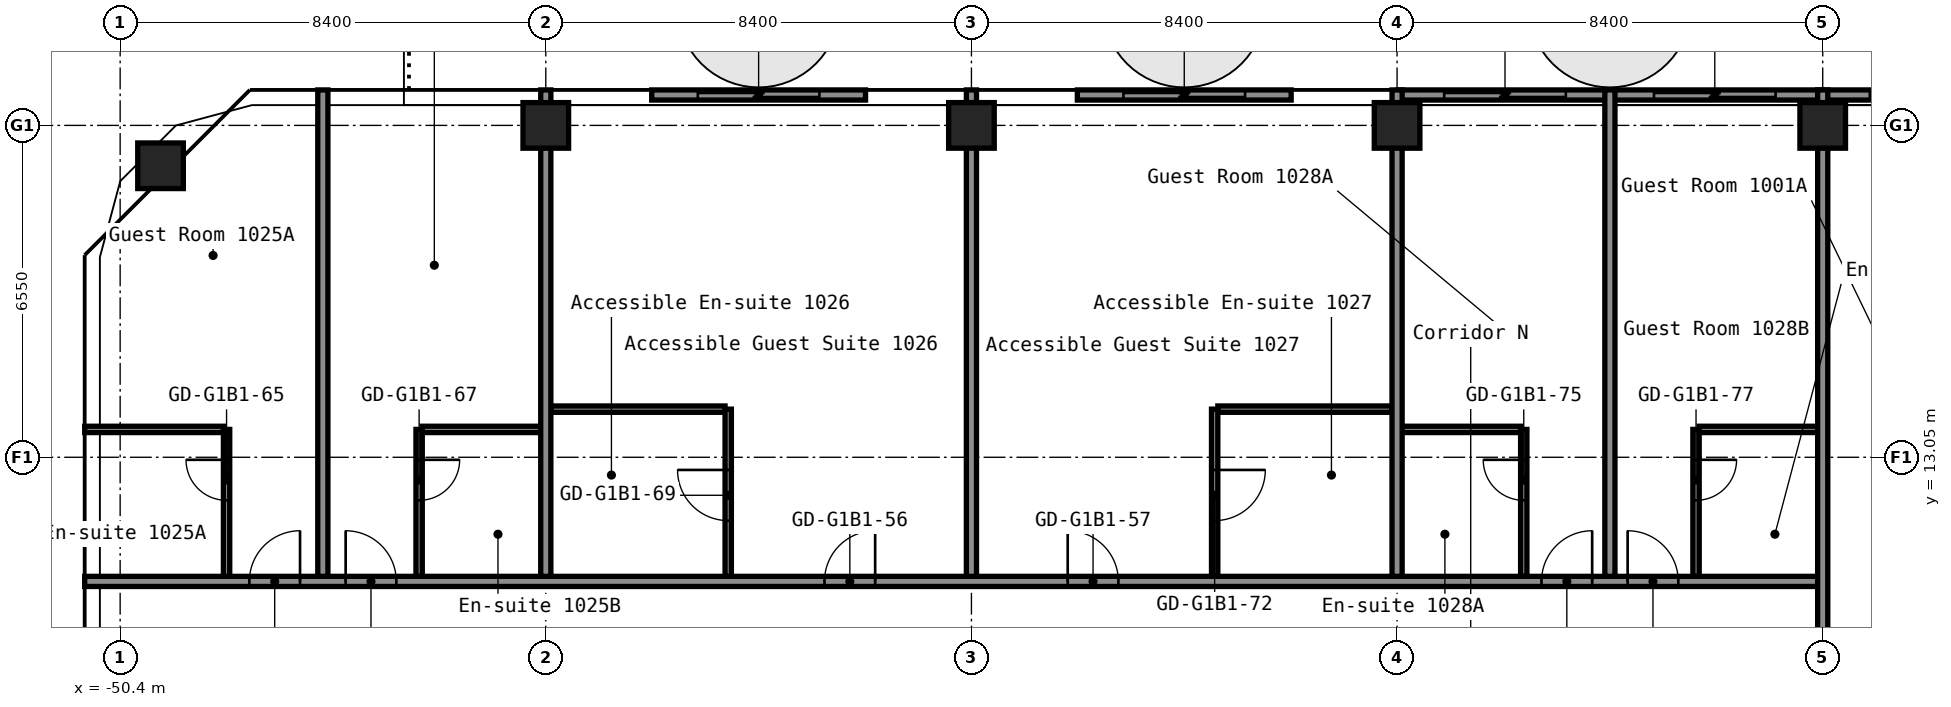
"""IFC4 building model, lengths in metres.
Left out: names, types, materials, properties, quantities, classifications, styles, units other than length and angle.
Written with IfcOpenShell. Run it as: python <this file> out.ifc"""

import sys

from ifc_helpers import new_model, si_unit, direction, frame, frame_2d, origin, origin_2d, place, context, subcontext, project, spatial, rectangle, hollow_rectangle, extrude, element, fill, save


model = new_model("IFC4")
c1 = context("Model", 3, precision=1e-05, world=origin(), true_north=direction((0.0, 1.0)))
c2 = subcontext(c1, "Body", "Model", "MODEL_VIEW")
j1 = project(units=[si_unit("LENGTHUNIT", "METRE"), si_unit("PLANEANGLEUNIT", "RADIAN")], contexts=[c1])
p1 = place(None, origin())
s1 = spatial("IfcSite", under=j1, at=p1, CompositionType="ELEMENT")
p2 = place(p1, origin())
s2 = spatial("IfcBuilding", under=s1, at=p2, CompositionType="ELEMENT")
p3 = place(p2, frame((0.0, 0.0, 39.0)))
s3 = spatial("IfcBuildingStorey", under=s2, at=p3, CompositionType="ELEMENT", Elevation=39.0)
for number, where, z_axis, x_axis in (
    (1, (-49.603, 18.803, 0.0), (0.0, 0.0, 1.0), (1.0, 0.0, 0.0)),
    (2, (-42.0, 19.6, 0.0), (0.0, 0.0, 1.0), (1.0, 0.0, 0.0)),
    (3, (-33.6, 19.6, 0.0), (0.0, 0.0, 1.0), (1.0, 0.0, 0.0)),
    (4, (-25.2, 19.6, 0.0), (0.0, 0.0, 1.0), (1.0, 0.0, 0.0)),
    (5, (-16.8, 19.6, 0.0), (0.0, 0.0, 1.0), (1.0, 0.0, 0.0)),
):
    element("IfcColumn", number, at=place(p3, frame(where, z_axis=z_axis, x_axis=x_axis)), inside=s3, PredefinedType="COLUMN", context=c2, shape_type="SweptSolid", body=[
        extrude(hollow_rectangle(XDim=0.9, YDim=0.9, WallThickness=0.036, at=origin_2d()), origin(), (0.0, 0.0, 1.0), 2.8),
    ])
p4 = place(p3, frame((-51.1, 10.6, 0.0), z_axis=(0.0, 0.0, 1.0), x_axis=(1.0, 0.0, 0.0)))
e6 = element("IfcWall", 6, at=p4, inside=s3, PredefinedType="PARTITIONING", context=c2, shape_type="SweptSolid", body=[
    extrude(rectangle(XDim=34.3, YDim=0.2, at=frame_2d((17.15, 0.0))), origin(), (0.0, 0.0, 1.0), 2.8),
])
p5 = place(p4, frame((3.25, 0.0, 0.0)))
e7 = element("IfcOpeningElement", 7, at=p5, cuts=e6, PredefinedType="OPENING", context=c2, shape_type="SweptSolid", body=[
    extrude(rectangle(XDim=1.0, YDim=2.1, at=frame_2d((0.5, 1.05))), frame((0.0, 0.11, 0.0), z_axis=(0.0, -1.0, 0.0), x_axis=(1.0, 0.0, 0.0)), (0.0, 0.0, 1.0), 0.22),
])
p6 = place(p4, frame((5.15, 0.0, 0.0)))
e8 = element("IfcOpeningElement", 8, at=p6, cuts=e6, PredefinedType="OPENING", context=c2, shape_type="SweptSolid", body=[
    extrude(rectangle(XDim=1.0, YDim=2.1, at=frame_2d((0.5, 1.05))), frame((0.0, 0.11, 0.0), z_axis=(0.0, -1.0, 0.0), x_axis=(1.0, 0.0, 0.0)), (0.0, 0.0, 1.0), 0.22),
])
p7 = place(p4, frame((14.6, 0.0, 0.0)))
e9 = element("IfcOpeningElement", 9, at=p7, cuts=e6, PredefinedType="OPENING", context=c2, shape_type="SweptSolid", body=[
    extrude(rectangle(XDim=1.0, YDim=2.1, at=frame_2d((0.5, 1.05))), frame((0.0, 0.11, 0.0), z_axis=(0.0, -1.0, 0.0), x_axis=(1.0, 0.0, 0.0)), (0.0, 0.0, 1.0), 0.22),
])
p8 = place(p4, frame((19.4, 0.0, 0.0)))
e10 = element("IfcOpeningElement", 10, at=p8, cuts=e6, PredefinedType="OPENING", context=c2, shape_type="SweptSolid", body=[
    extrude(rectangle(XDim=1.0, YDim=2.1, at=frame_2d((0.5, 1.05))), frame((0.0, 0.11, 0.0), z_axis=(0.0, -1.0, 0.0), x_axis=(1.0, 0.0, 0.0)), (0.0, 0.0, 1.0), 0.22),
])
p9 = place(p4, frame((28.75, 0.0, 0.0)))
e11 = element("IfcOpeningElement", 11, at=p9, cuts=e6, PredefinedType="OPENING", context=c2, shape_type="SweptSolid", body=[
    extrude(rectangle(XDim=1.0, YDim=2.1, at=frame_2d((0.5, 1.05))), frame((0.0, 0.11, 0.0), z_axis=(0.0, -1.0, 0.0), x_axis=(1.0, 0.0, 0.0)), (0.0, 0.0, 1.0), 0.22),
])
p10 = place(p4, frame((30.45, 0.0, 0.0)))
e12 = element("IfcOpeningElement", 12, at=p10, cuts=e6, PredefinedType="OPENING", context=c2, shape_type="SweptSolid", body=[
    extrude(rectangle(XDim=1.0, YDim=2.1, at=frame_2d((0.5, 1.05))), frame((0.0, 0.11, 0.0), z_axis=(0.0, -1.0, 0.0), x_axis=(1.0, 0.0, 0.0)), (0.0, 0.0, 1.0), 0.22),
])
p11 = place(p3, frame((-51.1, 13.6, 0.0), z_axis=(0.0, 0.0, 1.0), x_axis=(1.0, 0.0, 0.0)))
e13 = element("IfcWall", 13, at=p11, inside=s3, PredefinedType="PARTITIONING", context=c2, shape_type="SweptSolid", body=[
    extrude(rectangle(XDim=2.738, YDim=0.125, at=frame_2d((1.369, 0.0))), origin(), (0.0, 0.0, 1.0), 2.8),
])
p12 = place(p3, frame((-44.438, 13.6, 0.0), z_axis=(0.0, 0.0, 1.0), x_axis=(1.0, 0.0, 0.0)))
e14 = element("IfcWall", 14, at=p12, inside=s3, PredefinedType="PARTITIONING", context=c2, shape_type="SweptSolid", body=[
    extrude(rectangle(XDim=2.337, YDim=0.125, at=frame_2d((1.169, 0.0))), origin(), (0.0, 0.0, 1.0), 2.8),
])
for number, where, z_axis, x_axis in (
    (15, (-25.1, 13.6, 0.0), (0.0, 0.0, 1.0), (1.0, 0.0, 0.0)),
    (16, (-19.238, 13.6, 0.0), (0.0, 0.0, 1.0), (1.0, 0.0, 0.0)),
):
    element("IfcWall", number, at=place(p3, frame(where, z_axis=z_axis, x_axis=x_axis)), inside=s3, PredefinedType="PARTITIONING", context=c2, shape_type="SweptSolid", body=[
        extrude(rectangle(XDim=2.338, YDim=0.125, at=frame_2d((1.169, 0.0))), origin(), (0.0, 0.0, 1.0), 2.8),
    ])
for number, where, z_axis, x_axis in (
    (17, (-41.9, 14.0, 0.0), (0.0, 0.0, 1.0), (1.0, 0.0, 0.0)),
    (18, (-28.738, 14.0, 0.0), (0.0, 0.0, 1.0), (1.0, 0.0, 0.0)),
):
    element("IfcWall", number, at=place(p3, frame(where, z_axis=z_axis, x_axis=x_axis)), inside=s3, PredefinedType="PARTITIONING", context=c2, shape_type="SweptSolid", body=[
        extrude(rectangle(XDim=3.438, YDim=0.125, at=frame_2d((1.719, 0.0))), origin(), (0.0, 0.0, 1.0), 2.8),
    ])
p13 = place(p3, frame((-48.3, 10.7, 0.0), z_axis=(0.0, 0.0, 1.0), x_axis=(0.0, 1.0, 0.0)))
e19 = element("IfcWall", 19, at=p13, inside=s3, PredefinedType="PARTITIONING", context=c2, shape_type="SweptSolid", body=[
    extrude(rectangle(XDim=2.9, YDim=0.125, at=frame_2d((1.45, 0.0))), origin(), (0.0, 0.0, 1.0), 2.8),
])
p14 = place(p13, frame((1.5, 0.0, 0.0)))
e20 = element("IfcOpeningElement", 20, at=p14, cuts=e19, PredefinedType="OPENING", context=c2, shape_type="SweptSolid", body=[
    extrude(rectangle(XDim=0.8, YDim=2.1, at=frame_2d((0.4, 1.05))), frame((0.0, 0.073, 0.0), z_axis=(0.0, -1.0, 0.0), x_axis=(1.0, 0.0, 0.0)), (0.0, 0.0, 1.0), 0.145),
])
p15 = place(p3, frame((-46.4, 10.7, 0.0), z_axis=(0.0, 0.0, 1.0), x_axis=(0.0, 1.0, 0.0)))
e21 = element("IfcWall", 21, at=p15, inside=s3, PredefinedType="PARTITIONING", context=c2, shape_type="SweptSolid", body=[
    extrude(rectangle(XDim=9.6, YDim=0.2, at=frame_2d((4.8, 0.0))), origin(), (0.0, 0.0, 1.0), 2.8),
])
p16 = place(p3, frame((-44.5, 10.7, 0.0), z_axis=(0.0, 0.0, 1.0), x_axis=(0.0, 1.0, 0.0)))
e22 = element("IfcWall", 22, at=p16, inside=s3, PredefinedType="PARTITIONING", context=c2, shape_type="SweptSolid", body=[
    extrude(rectangle(XDim=2.9, YDim=0.125, at=frame_2d((1.45, 0.0))), origin(), (0.0, 0.0, 1.0), 2.8),
])
p17 = place(p16, frame((1.5, 0.0, 0.0)))
e23 = element("IfcOpeningElement", 23, at=p17, cuts=e22, PredefinedType="OPENING", context=c2, shape_type="SweptSolid", body=[
    extrude(rectangle(XDim=0.8, YDim=2.1, at=frame_2d((0.4, 1.05))), frame((0.0, 0.073, 0.0), z_axis=(0.0, -1.0, 0.0), x_axis=(1.0, 0.0, 0.0)), (0.0, 0.0, 1.0), 0.145),
])
p18 = place(p3, frame((-42.0, 10.7, 0.0), z_axis=(0.0, 0.0, 1.0), x_axis=(0.0, 1.0, 0.0)))
e24 = element("IfcWall", 24, at=p18, inside=s3, PredefinedType="PARTITIONING", context=c2, shape_type="SweptSolid", body=[
    extrude(rectangle(XDim=9.6, YDim=0.2, at=frame_2d((4.8, 0.0))), origin(), (0.0, 0.0, 1.0), 2.8),
])
p19 = place(p3, frame((-38.4, 10.7, 0.0), z_axis=(0.0, 0.0, 1.0), x_axis=(0.0, 1.0, 0.0)))
e25 = element("IfcWall", 25, at=p19, inside=s3, PredefinedType="PARTITIONING", context=c2, shape_type="SweptSolid", body=[
    extrude(rectangle(XDim=3.3, YDim=0.125, at=frame_2d((1.65, 0.0))), origin(), (0.0, 0.0, 1.0), 2.8),
])
p20 = place(p19, frame((1.1, 0.0, 0.0)))
e26 = element("IfcOpeningElement", 26, at=p20, cuts=e25, PredefinedType="OPENING", context=c2, shape_type="SweptSolid", body=[
    extrude(rectangle(XDim=1.0, YDim=2.1, at=frame_2d((0.5, 1.05))), frame((0.0, 0.073, 0.0), z_axis=(0.0, -1.0, 0.0), x_axis=(1.0, 0.0, 0.0)), (0.0, 0.0, 1.0), 0.145),
])
p21 = place(p3, frame((-33.6, 10.7, 0.0), z_axis=(0.0, 0.0, 1.0), x_axis=(0.0, 1.0, 0.0)))
e27 = element("IfcWall", 27, at=p21, inside=s3, PredefinedType="PARTITIONING", context=c2, shape_type="SweptSolid", body=[
    extrude(rectangle(XDim=9.6, YDim=0.2, at=frame_2d((4.8, 0.0))), origin(), (0.0, 0.0, 1.0), 2.8),
])
p22 = place(p3, frame((-28.8, 10.7, 0.0), z_axis=(0.0, 0.0, 1.0), x_axis=(0.0, 1.0, 0.0)))
e28 = element("IfcWall", 28, at=p22, inside=s3, PredefinedType="PARTITIONING", context=c2, shape_type="SweptSolid", body=[
    extrude(rectangle(XDim=3.3, YDim=0.125, at=frame_2d((1.65, 0.0))), origin(), (0.0, 0.0, 1.0), 2.8),
])
p23 = place(p22, frame((1.1, 0.0, 0.0)))
e29 = element("IfcOpeningElement", 29, at=p23, cuts=e28, PredefinedType="OPENING", context=c2, shape_type="SweptSolid", body=[
    extrude(rectangle(XDim=1.0, YDim=2.1, at=frame_2d((0.5, 1.05))), frame((0.0, 0.073, 0.0), z_axis=(0.0, -1.0, 0.0), x_axis=(1.0, 0.0, 0.0)), (0.0, 0.0, 1.0), 0.145),
])
p24 = place(p3, frame((-25.2, 10.7, 0.0), z_axis=(0.0, 0.0, 1.0), x_axis=(0.0, 1.0, 0.0)))
e30 = element("IfcWall", 30, at=p24, inside=s3, PredefinedType="PARTITIONING", context=c2, shape_type="SweptSolid", body=[
    extrude(rectangle(XDim=9.6, YDim=0.2, at=frame_2d((4.8, 0.0))), origin(), (0.0, 0.0, 1.0), 2.8),
])
p25 = place(p3, frame((-22.7, 10.7, 0.0), z_axis=(0.0, 0.0, 1.0), x_axis=(0.0, 1.0, 0.0)))
e31 = element("IfcWall", 31, at=p25, inside=s3, PredefinedType="PARTITIONING", context=c2, shape_type="SweptSolid", body=[
    extrude(rectangle(XDim=2.9, YDim=0.125, at=frame_2d((1.45, 0.0))), origin(), (0.0, 0.0, 1.0), 2.8),
])
p26 = place(p25, frame((1.5, 0.0, 0.0)))
e32 = element("IfcOpeningElement", 32, at=p26, cuts=e31, PredefinedType="OPENING", context=c2, shape_type="SweptSolid", body=[
    extrude(rectangle(XDim=0.8, YDim=2.1, at=frame_2d((0.4, 1.05))), frame((0.0, 0.073, 0.0), z_axis=(0.0, -1.0, 0.0), x_axis=(1.0, 0.0, 0.0)), (0.0, 0.0, 1.0), 0.145),
])
p27 = place(p3, frame((-21.0, 10.7, 0.0), z_axis=(0.0, 0.0, 1.0), x_axis=(0.0, 1.0, 0.0)))
e33 = element("IfcWall", 33, at=p27, inside=s3, PredefinedType="PARTITIONING", context=c2, shape_type="SweptSolid", body=[
    extrude(rectangle(XDim=9.6, YDim=0.2, at=frame_2d((4.8, 0.0))), origin(), (0.0, 0.0, 1.0), 2.8),
])
p28 = place(p3, frame((-19.3, 10.7, 0.0), z_axis=(0.0, 0.0, 1.0), x_axis=(0.0, 1.0, 0.0)))
e34 = element("IfcWall", 34, at=p28, inside=s3, PredefinedType="PARTITIONING", context=c2, shape_type="SweptSolid", body=[
    extrude(rectangle(XDim=2.9, YDim=0.125, at=frame_2d((1.45, 0.0))), origin(), (0.0, 0.0, 1.0), 2.8),
])
p29 = place(p28, frame((1.5, 0.0, 0.0)))
e35 = element("IfcOpeningElement", 35, at=p29, cuts=e34, PredefinedType="OPENING", context=c2, shape_type="SweptSolid", body=[
    extrude(rectangle(XDim=0.8, YDim=2.1, at=frame_2d((0.4, 1.05))), frame((0.0, 0.073, 0.0), z_axis=(0.0, -1.0, 0.0), x_axis=(1.0, 0.0, 0.0)), (0.0, 0.0, 1.0), 0.145),
])
p30 = place(p3, frame((-16.8, 8.39, 0.0), z_axis=(0.0, 0.0, 1.0), x_axis=(0.0, 1.0, 0.0)))
e36 = element("IfcWall", 36, at=p30, inside=s3, PredefinedType="PARTITIONING", context=c2, shape_type="SweptSolid", body=[
    extrude(rectangle(XDim=11.91, YDim=0.2, at=frame_2d((5.955, 0.0))), origin(), (0.0, 0.0, 1.0), 2.8),
])
p31 = place(p3, frame((-12.56, 20.2, 0.0), z_axis=(0.0, 0.0, 1.0), x_axis=(-1.0, 0.0, 0.0)))
p32 = place(p31, frame((0.91, 0.0, 0.0)))
p33 = place(p32, frame((2.4, 0.0, 0.0), z_axis=(0.0, 0.0, 1.0), x_axis=(-1.0, 0.0, 0.0)))
e37 = element("IfcDoor", 37, at=p33, inside=s3, OperationType="SLIDING_TO_LEFT", PredefinedType="DOOR", context=c2, shape_type="SweptSolid", body=[
    extrude(rectangle(XDim=2.4, YDim=2.2, at=frame_2d((1.2, 1.1))), frame((0.0, 0.025, 0.0), z_axis=(0.0, -1.0, 0.0), x_axis=(1.0, 0.0, 0.0)), (0.0, 0.0, 1.0), 0.05),
])
p34 = place(p3, frame((-16.82, 20.2, 0.0), z_axis=(0.0, 0.0, 1.0), x_axis=(-1.0, 0.0, 0.0)))
p35 = place(p34, frame((0.91, 0.0, 0.0)))
p36 = place(p35, frame((2.4, 0.0, 0.0), z_axis=(0.0, 0.0, 1.0), x_axis=(-1.0, 0.0, 0.0)))
e38 = element("IfcDoor", 38, at=p36, inside=s3, OperationType="SLIDING_TO_LEFT", PredefinedType="DOOR", context=c2, shape_type="SweptSolid", body=[
    extrude(rectangle(XDim=2.4, YDim=2.2, at=frame_2d((1.2, 1.1))), frame((0.0, 0.025, 0.0), z_axis=(0.0, -1.0, 0.0), x_axis=(1.0, 0.0, 0.0)), (0.0, 0.0, 1.0), 0.05),
])
p37 = place(p3, frame((-20.96, 20.2, 0.0), z_axis=(0.0, 0.0, 1.0), x_axis=(-1.0, 0.0, 0.0)))
p38 = place(p37, frame((0.91, 0.0, 0.0)))
p39 = place(p38, frame((2.4, 0.0, 0.0), z_axis=(0.0, 0.0, 1.0), x_axis=(-1.0, 0.0, 0.0)))
e39 = element("IfcDoor", 39, at=p39, inside=s3, OperationType="SLIDING_TO_LEFT", PredefinedType="DOOR", context=c2, shape_type="SweptSolid", body=[
    extrude(rectangle(XDim=2.4, YDim=2.2, at=frame_2d((1.2, 1.1))), frame((0.0, 0.025, 0.0), z_axis=(0.0, -1.0, 0.0), x_axis=(1.0, 0.0, 0.0)), (0.0, 0.0, 1.0), 0.05),
])
p40 = place(p3, frame((-27.29, 20.2, 0.0), z_axis=(0.0, 0.0, 1.0), x_axis=(-1.0, 0.0, 0.0)))
p41 = place(p40, frame((0.91, 0.0, 0.0)))
p42 = place(p41, frame((2.4, 0.0, 0.0), z_axis=(0.0, 0.0, 1.0), x_axis=(-1.0, 0.0, 0.0)))
e40 = element("IfcDoor", 40, at=p42, inside=s3, OperationType="SLIDING_TO_LEFT", PredefinedType="DOOR", context=c2, shape_type="SweptSolid", body=[
    extrude(rectangle(XDim=2.4, YDim=2.2, at=frame_2d((1.2, 1.1))), frame((0.0, 0.025, 0.0), z_axis=(0.0, -1.0, 0.0), x_axis=(1.0, 0.0, 0.0)), (0.0, 0.0, 1.0), 0.05),
])
p43 = place(p3, frame((-35.69, 20.2, 0.0), z_axis=(0.0, 0.0, 1.0), x_axis=(-1.0, 0.0, 0.0)))
p44 = place(p43, frame((0.91, 0.0, 0.0)))
p45 = place(p44, frame((2.4, 0.0, 0.0), z_axis=(0.0, 0.0, 1.0), x_axis=(-1.0, 0.0, 0.0)))
e41 = element("IfcDoor", 41, at=p45, inside=s3, OperationType="SLIDING_TO_LEFT", PredefinedType="DOOR", context=c2, shape_type="SweptSolid", body=[
    extrude(rectangle(XDim=2.4, YDim=2.2, at=frame_2d((1.2, 1.1))), frame((0.0, 0.025, 0.0), z_axis=(0.0, -1.0, 0.0), x_axis=(1.0, 0.0, 0.0)), (0.0, 0.0, 1.0), 0.05),
])
p46 = place(p5, origin())
e42 = element("IfcDoor", 42, at=p46, inside=s3, OperationType="SINGLE_SWING_LEFT", PredefinedType="DOOR", context=c2, shape_type="SweptSolid", body=[
    extrude(rectangle(XDim=1.0, YDim=2.1, at=frame_2d((0.5, 1.05))), frame((0.0, 0.025, 0.0), z_axis=(0.0, -1.0, 0.0), x_axis=(1.0, 0.0, 0.0)), (0.0, 0.0, 1.0), 0.05),
])
fill(e7, e42)
p47 = place(p6, origin())
e43 = element("IfcDoor", 43, at=p47, inside=s3, OperationType="SINGLE_SWING_RIGHT", PredefinedType="DOOR", context=c2, shape_type="SweptSolid", body=[
    extrude(rectangle(XDim=1.0, YDim=2.1, at=frame_2d((0.5, 1.05))), frame((0.0, 0.025, 0.0), z_axis=(0.0, -1.0, 0.0), x_axis=(1.0, 0.0, 0.0)), (0.0, 0.0, 1.0), 0.05),
])
fill(e8, e43)
p48 = place(p7, origin())
e44 = element("IfcDoor", 44, at=p48, inside=s3, OperationType="SINGLE_SWING_LEFT", PredefinedType="DOOR", context=c2, shape_type="SweptSolid", body=[
    extrude(rectangle(XDim=1.0, YDim=2.1, at=frame_2d((0.5, 1.05))), frame((0.0, 0.025, 0.0), z_axis=(0.0, -1.0, 0.0), x_axis=(1.0, 0.0, 0.0)), (0.0, 0.0, 1.0), 0.05),
])
fill(e9, e44)
p49 = place(p8, origin())
e45 = element("IfcDoor", 45, at=p49, inside=s3, OperationType="SINGLE_SWING_RIGHT", PredefinedType="DOOR", context=c2, shape_type="SweptSolid", body=[
    extrude(rectangle(XDim=1.0, YDim=2.1, at=frame_2d((0.5, 1.05))), frame((0.0, 0.025, 0.0), z_axis=(0.0, -1.0, 0.0), x_axis=(1.0, 0.0, 0.0)), (0.0, 0.0, 1.0), 0.05),
])
fill(e10, e45)
p50 = place(p9, origin())
e46 = element("IfcDoor", 46, at=p50, inside=s3, OperationType="SINGLE_SWING_LEFT", PredefinedType="DOOR", context=c2, shape_type="SweptSolid", body=[
    extrude(rectangle(XDim=1.0, YDim=2.1, at=frame_2d((0.5, 1.05))), frame((0.0, 0.025, 0.0), z_axis=(0.0, -1.0, 0.0), x_axis=(1.0, 0.0, 0.0)), (0.0, 0.0, 1.0), 0.05),
])
fill(e11, e46)
p51 = place(p10, origin())
e47 = element("IfcDoor", 47, at=p51, inside=s3, OperationType="SINGLE_SWING_RIGHT", PredefinedType="DOOR", context=c2, shape_type="SweptSolid", body=[
    extrude(rectangle(XDim=1.0, YDim=2.1, at=frame_2d((0.5, 1.05))), frame((0.0, 0.025, 0.0), z_axis=(0.0, -1.0, 0.0), x_axis=(1.0, 0.0, 0.0)), (0.0, 0.0, 1.0), 0.05),
])
fill(e12, e47)
p52 = place(p14, origin())
e48 = element("IfcDoor", 48, at=p52, inside=s3, OperationType="SINGLE_SWING_LEFT", PredefinedType="DOOR", context=c2, shape_type="SweptSolid", body=[
    extrude(rectangle(XDim=0.8, YDim=2.1, at=frame_2d((0.4, 1.05))), frame((0.0, 0.025, 0.0), z_axis=(0.0, -1.0, 0.0), x_axis=(1.0, 0.0, 0.0)), (0.0, 0.0, 1.0), 0.05),
])
fill(e20, e48)
p53 = place(p17, origin())
e49 = element("IfcDoor", 49, at=p53, inside=s3, OperationType="SINGLE_SWING_RIGHT", PredefinedType="DOOR", context=c2, shape_type="SweptSolid", body=[
    extrude(rectangle(XDim=0.8, YDim=2.1, at=frame_2d((0.4, 1.05))), frame((0.0, 0.025, 0.0), z_axis=(0.0, -1.0, 0.0), x_axis=(1.0, 0.0, 0.0)), (0.0, 0.0, 1.0), 0.05),
])
fill(e23, e49)
p54 = place(p20, origin())
e50 = element("IfcDoor", 50, at=p54, inside=s3, OperationType="SINGLE_SWING_LEFT", PredefinedType="DOOR", context=c2, shape_type="SweptSolid", body=[
    extrude(rectangle(XDim=1.0, YDim=2.1, at=frame_2d((0.5, 1.05))), frame((0.0, 0.025, 0.0), z_axis=(0.0, -1.0, 0.0), x_axis=(1.0, 0.0, 0.0)), (0.0, 0.0, 1.0), 0.05),
])
fill(e26, e50)
p55 = place(p23, origin())
e51 = element("IfcDoor", 51, at=p55, inside=s3, OperationType="SINGLE_SWING_RIGHT", PredefinedType="DOOR", context=c2, shape_type="SweptSolid", body=[
    extrude(rectangle(XDim=1.0, YDim=2.1, at=frame_2d((0.5, 1.05))), frame((0.0, 0.025, 0.0), z_axis=(0.0, -1.0, 0.0), x_axis=(1.0, 0.0, 0.0)), (0.0, 0.0, 1.0), 0.05),
])
fill(e29, e51)
p56 = place(p26, origin())
e52 = element("IfcDoor", 52, at=p56, inside=s3, OperationType="SINGLE_SWING_LEFT", PredefinedType="DOOR", context=c2, shape_type="SweptSolid", body=[
    extrude(rectangle(XDim=0.8, YDim=2.1, at=frame_2d((0.4, 1.05))), frame((0.0, 0.025, 0.0), z_axis=(0.0, -1.0, 0.0), x_axis=(1.0, 0.0, 0.0)), (0.0, 0.0, 1.0), 0.05),
])
fill(e32, e52)
p57 = place(p29, origin())
e53 = element("IfcDoor", 53, at=p57, inside=s3, OperationType="SINGLE_SWING_RIGHT", PredefinedType="DOOR", context=c2, shape_type="SweptSolid", body=[
    extrude(rectangle(XDim=0.8, YDim=2.1, at=frame_2d((0.4, 1.05))), frame((0.0, 0.025, 0.0), z_axis=(0.0, -1.0, 0.0), x_axis=(1.0, 0.0, 0.0)), (0.0, 0.0, 1.0), 0.05),
])
fill(e35, e53)
save(model, sys.argv[1])
